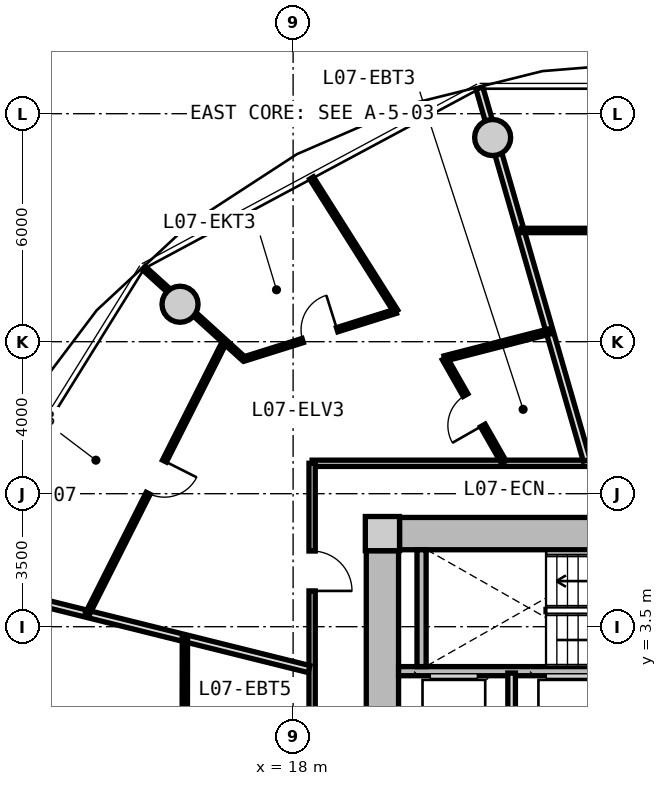
"""IFC4 building model, lengths in metres.
Left out: names, types, materials, properties, quantities, classifications, styles, units other than length and angle.
Written with IfcOpenShell. Run it as: python <this file> out.ifc"""

import sys

from ifc_helpers import new_model, si_unit, direction, frame, frame_2d, origin, origin_2d, place, context, subcontext, project, spatial, rectangle, circle, extrude, source, transform, mapped, element, fill, save


model = new_model("IFC4")
c1 = context("Model", 3, precision=1e-05, world=origin(), true_north=direction((0.0, 1.0)))
c2 = subcontext(c1, "Body", "Model", "MODEL_VIEW")
j1 = project(units=[si_unit("LENGTHUNIT", "METRE"), si_unit("PLANEANGLEUNIT", "RADIAN")], contexts=[c1])
p1 = place(None, origin())
s1 = spatial("IfcSite", under=j1, at=p1, CompositionType="ELEMENT")
p2 = place(p1, origin())
s2 = spatial("IfcBuilding", under=s1, at=p2, CompositionType="ELEMENT")
p3 = place(p2, frame((0.0, 0.0, 27.7)))
s3 = spatial("IfcBuildingStorey", under=s2, at=p3, CompositionType="ELEMENT", Elevation=27.7)
m1 = source(origin(), c2, "Body", "SweptSolid", [
    extrude(rectangle(XDim=0.9, YDim=0.9, at=origin_2d()), origin(), (0.0, 0.0, 1.0), 3.05),
])
p4 = place(p3, frame((20.35, 5.95, 0.0), z_axis=(0.0, 0.0, 1.0), x_axis=(1.0, 0.0, 0.0)))
e1 = element("IfcColumn", 1, at=p4, inside=s3, PredefinedType="COLUMN", context=c2, shape_type="MappedRepresentation", body=[
    mapped(m1, transform((0.0, 0.0, 0.0), x_axis=(1.0, 0.0, 0.0), y_axis=(0.0, 1.0, 0.0), z_axis=(0.0, 0.0, 1.0), scale=1.0)),
])
m2 = source(origin(), c2, "Body", "SweptSolid", [
    extrude(rectangle(XDim=14.4, YDim=0.85, at=frame_2d((7.2, 0.0))), origin(), (0.0, 0.0, 1.0), 2.79),
])
p5 = place(p3, frame((20.8, 5.95, 0.0), z_axis=(0.0, 0.0, 1.0), x_axis=(1.0, 0.0, 0.0)))
e2 = element("IfcWall", 2, at=p5, inside=s3, PredefinedType="SHEAR", context=c2, shape_type="MappedRepresentation", body=[
    mapped(m2, transform((0.0, 0.0, 0.0), x_axis=(1.0, 0.0, 0.0), y_axis=(0.0, 1.0, 0.0), z_axis=(0.0, 0.0, 1.0), scale=1.0)),
])
m3 = source(origin(), c2, "Body", "SweptSolid", [
    extrude(rectangle(XDim=11.0, YDim=0.85, at=frame_2d((5.5, 0.0))), origin(), (0.0, 0.0, 1.0), 2.79),
])
p6 = place(p3, frame((20.35, -5.5, 0.0), z_axis=(0.0, 0.0, 1.0), x_axis=(0.0, 1.0, 0.0)))
e3 = element("IfcWall", 3, at=p6, inside=s3, PredefinedType="SHEAR", context=c2, shape_type="MappedRepresentation", body=[
    mapped(m3, transform((0.0, 0.0, 0.0), x_axis=(1.0, 0.0, 0.0), y_axis=(0.0, 1.0, 0.0), z_axis=(0.0, 0.0, 1.0), scale=1.0)),
])
p7 = place(p6, frame((3.8, 0.0, 0.0)))
e4 = element("IfcOpeningElement", 4, at=p7, cuts=e3, PredefinedType="OPENING", context=c2, shape_type="SweptSolid", body=[
    extrude(rectangle(XDim=1.2, YDim=2.15, at=frame_2d((0.6, 1.075))), frame((0.0, 0.435, 0.0), z_axis=(0.0, -1.0, 0.0), x_axis=(1.0, 0.0, 0.0)), (0.0, 0.0, 1.0), 0.87),
])
m4 = source(origin(), c2, "Body", "SweptSolid", [
    extrude(circle(Radius=0.475, at=origin_2d()), origin(), (0.0, 0.0, 1.0), 3.05),
])
for number, where, z_axis, x_axis in (
    (5, (23.251, 16.373, 0.0), (0.0, 0.0, 1.0), (1.0, 0.0, 0.0)),
    (6, (15.025, 11.985, 0.0), (0.0, 0.0, 1.0), (1.0, 0.0, 0.0)),
):
    element("IfcColumn", number, at=place(p3, frame(where, z_axis=z_axis, x_axis=x_axis)), inside=s3, PredefinedType="COLUMN", context=c2, shape_type="MappedRepresentation", body=[
        mapped(m4, transform((0.0, 0.0, 0.0), x_axis=(1.0, 0.0, 0.0), y_axis=(0.0, 1.0, 0.0), z_axis=(0.0, 0.0, 1.0), scale=1.0)),
    ])
m5 = source(origin(), c2, "Body", "SweptSolid", [
    extrude(rectangle(XDim=7.765, YDim=0.24, at=frame_2d((3.883, 0.0))), origin(), (0.0, 0.0, 1.0), 2.79),
])
p8 = place(p3, frame((20.775, 2.33, 0.0), z_axis=(0.0, 0.0, 1.0), x_axis=(1.0, 0.0, 0.0)))
e7 = element("IfcWall", 7, at=p8, inside=s3, PredefinedType="PARTITIONING", context=c2, shape_type="MappedRepresentation", body=[
    mapped(m5, transform((0.0, 0.0, 0.0), x_axis=(1.0, 0.0, 0.0), y_axis=(0.0, 1.0, 0.0), z_axis=(0.0, 0.0, 1.0), scale=1.0)),
])
m6 = source(origin(), c2, "Body", "SweptSolid", [
    extrude(rectangle(XDim=3.075, YDim=0.24, at=frame_2d((1.538, 0.0))), origin(), (0.0, 0.0, 1.0), 2.79),
])
p9 = place(p3, frame((21.38, 2.45, 0.0), z_axis=(0.0, 0.0, 1.0), x_axis=(0.0, 1.0, 0.0)))
e8 = element("IfcWall", 8, at=p9, inside=s3, PredefinedType="PARTITIONING", context=c2, shape_type="MappedRepresentation", body=[
    mapped(m6, transform((0.0, 0.0, 0.0), x_axis=(1.0, 0.0, 0.0), y_axis=(0.0, 1.0, 0.0), z_axis=(0.0, 0.0, 1.0), scale=1.0)),
])
m7 = source(origin(), c2, "Body", "SweptSolid", [
    extrude(rectangle(XDim=2.33, YDim=0.2, at=frame_2d((1.165, 0.0))), origin(), (0.0, 0.0, 1.0), 2.775),
])
p10 = place(p3, frame((23.75, -0.05, 0.0), z_axis=(0.0, 0.0, 1.0), x_axis=(0.0, 1.0, 0.0)))
e9 = element("IfcWall", 9, at=p10, inside=s3, PredefinedType="PARTITIONING", context=c2, shape_type="MappedRepresentation", body=[
    mapped(m7, transform((0.0, 0.0, 0.0), x_axis=(1.0, 0.0, 0.0), y_axis=(0.0, 1.0, 0.0), z_axis=(0.0, 0.0, 1.0), scale=1.0)),
])
m8 = source(origin(), c2, "Body", "SweptSolid", [
    extrude(rectangle(XDim=19.0, YDim=0.165, at=frame_2d((9.5, 0.0))), origin(), (0.0, 0.0, 1.0), 2.775),
])
p11 = place(p3, frame((18.5, 7.8, 0.0), z_axis=(0.0, 0.0, 1.0), x_axis=(1.0, 0.0, 0.0)))
e10 = element("IfcWall", 10, at=p11, inside=s3, PredefinedType="PARTITIONING", context=c2, shape_type="MappedRepresentation", body=[
    mapped(m8, transform((0.0, 0.0, 0.0), x_axis=(1.0, 0.0, 0.0), y_axis=(0.0, 1.0, 0.0), z_axis=(0.0, 0.0, 1.0), scale=1.0)),
])
p12 = place(p11, frame((10.448, 0.0, 0.0)))
e11 = element("IfcOpeningElement", 11, at=p12, cuts=e10, PredefinedType="OPENING", context=c2, shape_type="SweptSolid", body=[
    extrude(rectangle(XDim=1.05, YDim=2.15, at=frame_2d((0.525, 1.075))), frame((0.0, 0.093, 0.0), z_axis=(0.0, -1.0, 0.0), x_axis=(1.0, 0.0, 0.0)), (0.0, 0.0, 1.0), 0.185),
])
m9 = source(origin(), c2, "Body", "SweptSolid", [
    extrude(rectangle(XDim=15.6, YDim=0.165, at=frame_2d((7.8, 0.0))), origin(), (0.0, 0.0, 1.0), 2.775),
])
p13 = place(p3, frame((18.5, -7.8, 0.0), z_axis=(0.0, 0.0, 1.0), x_axis=(0.0, 1.0, 0.0)))
e12 = element("IfcWall", 12, at=p13, inside=s3, PredefinedType="PARTITIONING", context=c2, shape_type="MappedRepresentation", body=[
    mapped(m9, transform((0.0, 0.0, 0.0), x_axis=(1.0, 0.0, 0.0), y_axis=(0.0, 1.0, 0.0), z_axis=(0.0, 0.0, 1.0), scale=1.0)),
])
p14 = place(p13, frame((12.241, 0.0, 0.0)))
e13 = element("IfcOpeningElement", 13, at=p14, cuts=e12, PredefinedType="OPENING", context=c2, shape_type="SweptSolid", body=[
    extrude(rectangle(XDim=1.05, YDim=2.15, at=frame_2d((0.525, 1.075))), frame((0.0, 0.093, 0.0), z_axis=(0.0, -1.0, 0.0), x_axis=(1.0, 0.0, 0.0)), (0.0, 0.0, 1.0), 0.185),
])
p15 = place(p13, frame((3.63, 0.0, 0.0)))
e14 = element("IfcOpeningElement", 14, at=p15, cuts=e12, PredefinedType="OPENING", context=c2, shape_type="SweptSolid", body=[
    extrude(rectangle(XDim=1.05, YDim=2.15, at=frame_2d((0.525, 1.075))), frame((0.0, 0.093, 0.0), z_axis=(0.0, -1.0, 0.0), x_axis=(1.0, 0.0, 0.0)), (0.0, 0.0, 1.0), 0.185),
])
m10 = source(origin(), c2, "Body", "SweptSolid", [
    extrude(rectangle(XDim=10.196, YDim=0.19, at=frame_2d((5.098, 0.0))), origin(), (0.0, 0.0, 1.0), 2.225),
])
p16 = place(p3, frame((25.727, 7.88, 0.0), z_axis=(0.0, 0.0, 1.0), x_axis=(-0.277136420347, 0.960830580549, 0.0)))
e15 = element("IfcWall", 15, at=p16, inside=s3, PredefinedType="PARTITIONING", context=c2, shape_type="MappedRepresentation", body=[
    mapped(m10, transform((0.0, 0.0, 0.0), x_axis=(1.0, 0.0, 0.0), y_axis=(0.0, 1.0, 0.0), z_axis=(0.0, 0.0, 1.0), scale=1.0)),
])
m11 = source(origin(), c2, "Body", "SweptSolid", [
    extrude(rectangle(XDim=7.993, YDim=0.115, at=frame_2d((3.996, 0.0))), origin(), (0.0, 0.0, 1.0), 2.775),
])
p17 = place(p3, frame((31.996, 13.927, 0.0), z_axis=(0.0, 0.0, 1.0), x_axis=(-1.0, 0.0, 0.0)))
e16 = element("IfcWall", 16, at=p17, inside=s3, PredefinedType="PARTITIONING", context=c2, shape_type="MappedRepresentation", body=[
    mapped(m11, transform((0.0, 0.0, 0.0), x_axis=(1.0, 0.0, 0.0), y_axis=(0.0, 1.0, 0.0), z_axis=(0.0, 0.0, 1.0), scale=1.0)),
])
p18 = place(p17, frame((3.521, 0.0, 0.0)))
e17 = element("IfcOpeningElement", 17, at=p18, cuts=e16, PredefinedType="OPENING", context=c2, shape_type="SweptSolid", body=[
    extrude(rectangle(XDim=0.95, YDim=2.1, at=frame_2d((0.475, 1.05))), frame((0.0, 0.067, 0.0), z_axis=(0.0, -1.0, 0.0), x_axis=(1.0, 0.0, 0.0)), (0.0, 0.0, 1.0), 0.135),
])
m12 = source(origin(), c2, "Body", "SweptSolid", [
    extrude(rectangle(XDim=9.737, YDim=0.19, at=frame_2d((4.869, 0.0))), origin(), (0.0, 0.0, 1.0), 2.225),
])
p19 = place(p3, frame((18.42, 2.385, 0.0), z_axis=(0.0, 0.0, 1.0), x_axis=(-0.970392716238, 0.241532557375, 0.0)))
e18 = element("IfcWall", 18, at=p19, inside=s3, PredefinedType="PARTITIONING", context=c2, shape_type="MappedRepresentation", body=[
    mapped(m12, transform((0.0, 0.0, 0.0), x_axis=(1.0, 0.0, 0.0), y_axis=(0.0, 1.0, 0.0), z_axis=(0.0, 0.0, 1.0), scale=1.0)),
])
m13 = source(origin(), c2, "Body", "SweptSolid", [
    extrude(rectangle(XDim=8.018, YDim=0.115, at=frame_2d((4.009, 0.0))), origin(), (0.0, 0.0, 1.0), 2.775),
])
p20 = place(p3, frame((16.205, 11.014, 0.0), z_axis=(0.0, 0.0, 1.0), x_axis=(-0.450134355233, -0.89296084026, 0.0)))
e19 = element("IfcWall", 19, at=p20, inside=s3, PredefinedType="PARTITIONING", context=c2, shape_type="MappedRepresentation", body=[
    mapped(m13, transform((0.0, 0.0, 0.0), x_axis=(1.0, 0.0, 0.0), y_axis=(0.0, 1.0, 0.0), z_axis=(0.0, 0.0, 1.0), scale=1.0)),
])
p21 = place(p20, frame((3.534, 0.0, 0.0)))
e20 = element("IfcOpeningElement", 20, at=p21, cuts=e19, PredefinedType="OPENING", context=c2, shape_type="SweptSolid", body=[
    extrude(rectangle(XDim=0.95, YDim=2.1, at=frame_2d((0.475, 1.05))), frame((0.0, 0.067, 0.0), z_axis=(0.0, -1.0, 0.0), x_axis=(1.0, 0.0, 0.0)), (0.0, 0.0, 1.0), 0.135),
])
m14 = source(origin(), c2, "Body", "SweptSolid", [
    extrude(rectangle(XDim=3.551, YDim=0.115, at=frame_2d((1.775, 0.0))), origin(), (0.0, 0.0, 1.0), 2.225),
])
p22 = place(p3, frame((16.698, 10.553, 0.0), z_axis=(0.0, 0.0, 1.0), x_axis=(-0.740291560769, 0.672285954824, 0.0)))
e21 = element("IfcWall", 21, at=p22, inside=s3, PredefinedType="PARTITIONING", context=c2, shape_type="MappedRepresentation", body=[
    mapped(m14, transform((0.0, 0.0, 0.0), x_axis=(1.0, 0.0, 0.0), y_axis=(0.0, 1.0, 0.0), z_axis=(0.0, 0.0, 1.0), scale=1.0)),
])
m15 = source(origin(), c2, "Body", "SweptSolid", [
    extrude(rectangle(XDim=3.141, YDim=0.14, at=frame_2d((1.571, 0.0))), origin(), (0.0, 0.0, 1.0), 2.775),
])
p23 = place(p3, frame((23.542, 7.83, 0.0), z_axis=(0.0, 0.0, 1.0), x_axis=(-0.494874486088, 0.868964465913, 0.0)))
e22 = element("IfcWall", 22, at=p23, inside=s3, PredefinedType="PARTITIONING", context=c2, shape_type="MappedRepresentation", body=[
    mapped(m15, transform((0.0, 0.0, 0.0), x_axis=(1.0, 0.0, 0.0), y_axis=(0.0, 1.0, 0.0), z_axis=(0.0, 0.0, 1.0), scale=1.0)),
])
p24 = place(p23, frame((1.111, 0.0, 0.0)))
e23 = element("IfcOpeningElement", 23, at=p24, cuts=e22, PredefinedType="OPENING", context=c2, shape_type="SweptSolid", body=[
    extrude(rectangle(XDim=0.92, YDim=2.1, at=frame_2d((0.46, 1.05))), frame((0.0, 0.08, 0.0), z_axis=(0.0, -1.0, 0.0), x_axis=(1.0, 0.0, 0.0)), (0.0, 0.0, 1.0), 0.16),
])
m16 = source(origin(), c2, "Body", "SweptSolid", [
    extrude(rectangle(XDim=2.868, YDim=0.14, at=frame_2d((1.434, 0.0))), origin(), (0.0, 0.0, 1.0), 2.775),
])
p25 = place(p3, frame((21.987, 10.56, 0.0), z_axis=(0.0, 0.0, 1.0), x_axis=(0.968467705195, 0.249139125778, 0.0)))
e24 = element("IfcWall", 24, at=p25, inside=s3, PredefinedType="PARTITIONING", context=c2, shape_type="MappedRepresentation", body=[
    mapped(m16, transform((0.0, 0.0, 0.0), x_axis=(1.0, 0.0, 0.0), y_axis=(0.0, 1.0, 0.0), z_axis=(0.0, 0.0, 1.0), scale=1.0)),
])
m17 = source(origin(), c2, "Body", "SweptSolid", [
    extrude(rectangle(XDim=4.15, YDim=0.115, at=frame_2d((2.075, 0.0))), origin(), (0.0, 0.0, 1.0), 2.775),
])
p26 = place(p3, frame((20.704, 11.801, 0.0), z_axis=(0.0, 0.0, 1.0), x_axis=(-0.534475378192, 0.845184045109, 0.0)))
e25 = element("IfcWall", 25, at=p26, inside=s3, PredefinedType="PARTITIONING", context=c2, shape_type="MappedRepresentation", body=[
    mapped(m17, transform((0.0, 0.0, 0.0), x_axis=(1.0, 0.0, 0.0), y_axis=(0.0, 1.0, 0.0), z_axis=(0.0, 0.0, 1.0), scale=1.0)),
])
m18 = source(origin(), c2, "Body", "SweptSolid", [
    extrude(rectangle(XDim=4.189, YDim=0.115, at=frame_2d((2.094, 0.0))), origin(), (0.0, 0.0, 1.0), 2.775),
])
p27 = place(p3, frame((20.704, 11.801, 0.0), z_axis=(0.0, 0.0, 1.0), x_axis=(-0.954002766053, -0.299797802467, 0.0)))
e26 = element("IfcWall", 26, at=p27, inside=s3, PredefinedType="PARTITIONING", context=c2, shape_type="MappedRepresentation", body=[
    mapped(m18, transform((0.0, 0.0, 0.0), x_axis=(1.0, 0.0, 0.0), y_axis=(0.0, 1.0, 0.0), z_axis=(0.0, 0.0, 1.0), scale=1.0)),
])
p28 = place(p27, frame((1.619, 0.0, 0.0)))
e27 = element("IfcOpeningElement", 27, at=p28, cuts=e26, PredefinedType="OPENING", context=c2, shape_type="SweptSolid", body=[
    extrude(rectangle(XDim=0.95, YDim=2.1, at=frame_2d((0.475, 1.05))), frame((0.0, 0.067, 0.0), z_axis=(0.0, -1.0, 0.0), x_axis=(1.0, 0.0, 0.0)), (0.0, 0.0, 1.0), 0.135),
])
m19 = source(origin(), c2, "Body", "SweptSolid", [
    extrude(rectangle(XDim=2.795, YDim=0.14, at=frame_2d((1.397, 0.0))), origin(), (0.0, 0.0, 1.0), 2.775),
])
p29 = place(p3, frame((15.148, 0.419, 0.0), z_axis=(0.0, 0.0, 1.0), x_axis=(0.001659531299, 0.999998622977, 0.0)))
e28 = element("IfcWall", 28, at=p29, inside=s3, PredefinedType="PARTITIONING", context=c2, shape_type="MappedRepresentation", body=[
    mapped(m19, transform((0.0, 0.0, 0.0), x_axis=(1.0, 0.0, 0.0), y_axis=(0.0, 1.0, 0.0), z_axis=(0.0, 0.0, 1.0), scale=1.0)),
])
m20 = source(origin(), c2, "Body", "SweptSolid", [
    extrude(rectangle(XDim=1.05, YDim=2.15, at=frame_2d((0.525, 1.075))), frame((0.0, 0.025, 0.0), z_axis=(0.0, -1.0, 0.0), x_axis=(1.0, 0.0, 0.0)), (0.0, 0.0, 1.0), 0.05),
])
p30 = place(p14, frame((1.05, 0.0, 0.0), z_axis=(0.0, 0.0, 1.0), x_axis=(-1.0, 0.0, 0.0)))
e29 = element("IfcDoor", 29, at=p30, inside=s3, OperationType="SINGLE_SWING_RIGHT", PredefinedType="DOOR", context=c2, shape_type="MappedRepresentation", body=[
    mapped(m20, transform((0.0, 0.0, 0.0), x_axis=(1.0, 0.0, 0.0), y_axis=(0.0, 1.0, 0.0), z_axis=(0.0, 0.0, 1.0), scale=1.0)),
])
fill(e13, e29)
m21 = source(origin(), c2, "Body", "SweptSolid", [
    extrude(rectangle(XDim=0.92, YDim=2.1, at=frame_2d((0.46, 1.05))), frame((0.0, 0.025, 0.0), z_axis=(0.0, -1.0, 0.0), x_axis=(1.0, 0.0, 0.0)), (0.0, 0.0, 1.0), 0.05),
])
p31 = place(p24, origin())
e30 = element("IfcDoor", 30, at=p31, inside=s3, OperationType="SINGLE_SWING_LEFT", PredefinedType="DOOR", context=c2, shape_type="MappedRepresentation", body=[
    mapped(m21, transform((0.0, 0.0, 0.0), x_axis=(1.0, 0.0, 0.0), y_axis=(0.0, 1.0, 0.0), z_axis=(0.0, 0.0, 1.0), scale=1.0)),
])
fill(e23, e30)
m22 = source(origin(), c2, "Body", "SweptSolid", [
    extrude(rectangle(XDim=0.95, YDim=2.1, at=frame_2d((0.475, 1.05))), frame((0.0, 0.025, 0.0), z_axis=(0.0, -1.0, 0.0), x_axis=(1.0, 0.0, 0.0)), (0.0, 0.0, 1.0), 0.05),
])
p32 = place(p28, frame((0.95, 0.0, 0.0), z_axis=(0.0, 0.0, 1.0), x_axis=(-1.0, 0.0, 0.0)))
e31 = element("IfcDoor", 31, at=p32, inside=s3, OperationType="SINGLE_SWING_RIGHT", PredefinedType="DOOR", context=c2, shape_type="MappedRepresentation", body=[
    mapped(m22, transform((0.0, 0.0, 0.0), x_axis=(1.0, 0.0, 0.0), y_axis=(0.0, 1.0, 0.0), z_axis=(0.0, 0.0, 1.0), scale=1.0)),
])
fill(e27, e31)
p33 = place(p21, origin())
e32 = element("IfcDoor", 32, at=p33, inside=s3, OperationType="SINGLE_SWING_LEFT", PredefinedType="DOOR", context=c2, shape_type="MappedRepresentation", body=[
    mapped(m22, transform((0.0, 0.0, 0.0), x_axis=(1.0, 0.0, 0.0), y_axis=(0.0, 1.0, 0.0), z_axis=(0.0, 0.0, 1.0), scale=1.0)),
])
fill(e20, e32)
save(model, sys.argv[1])
